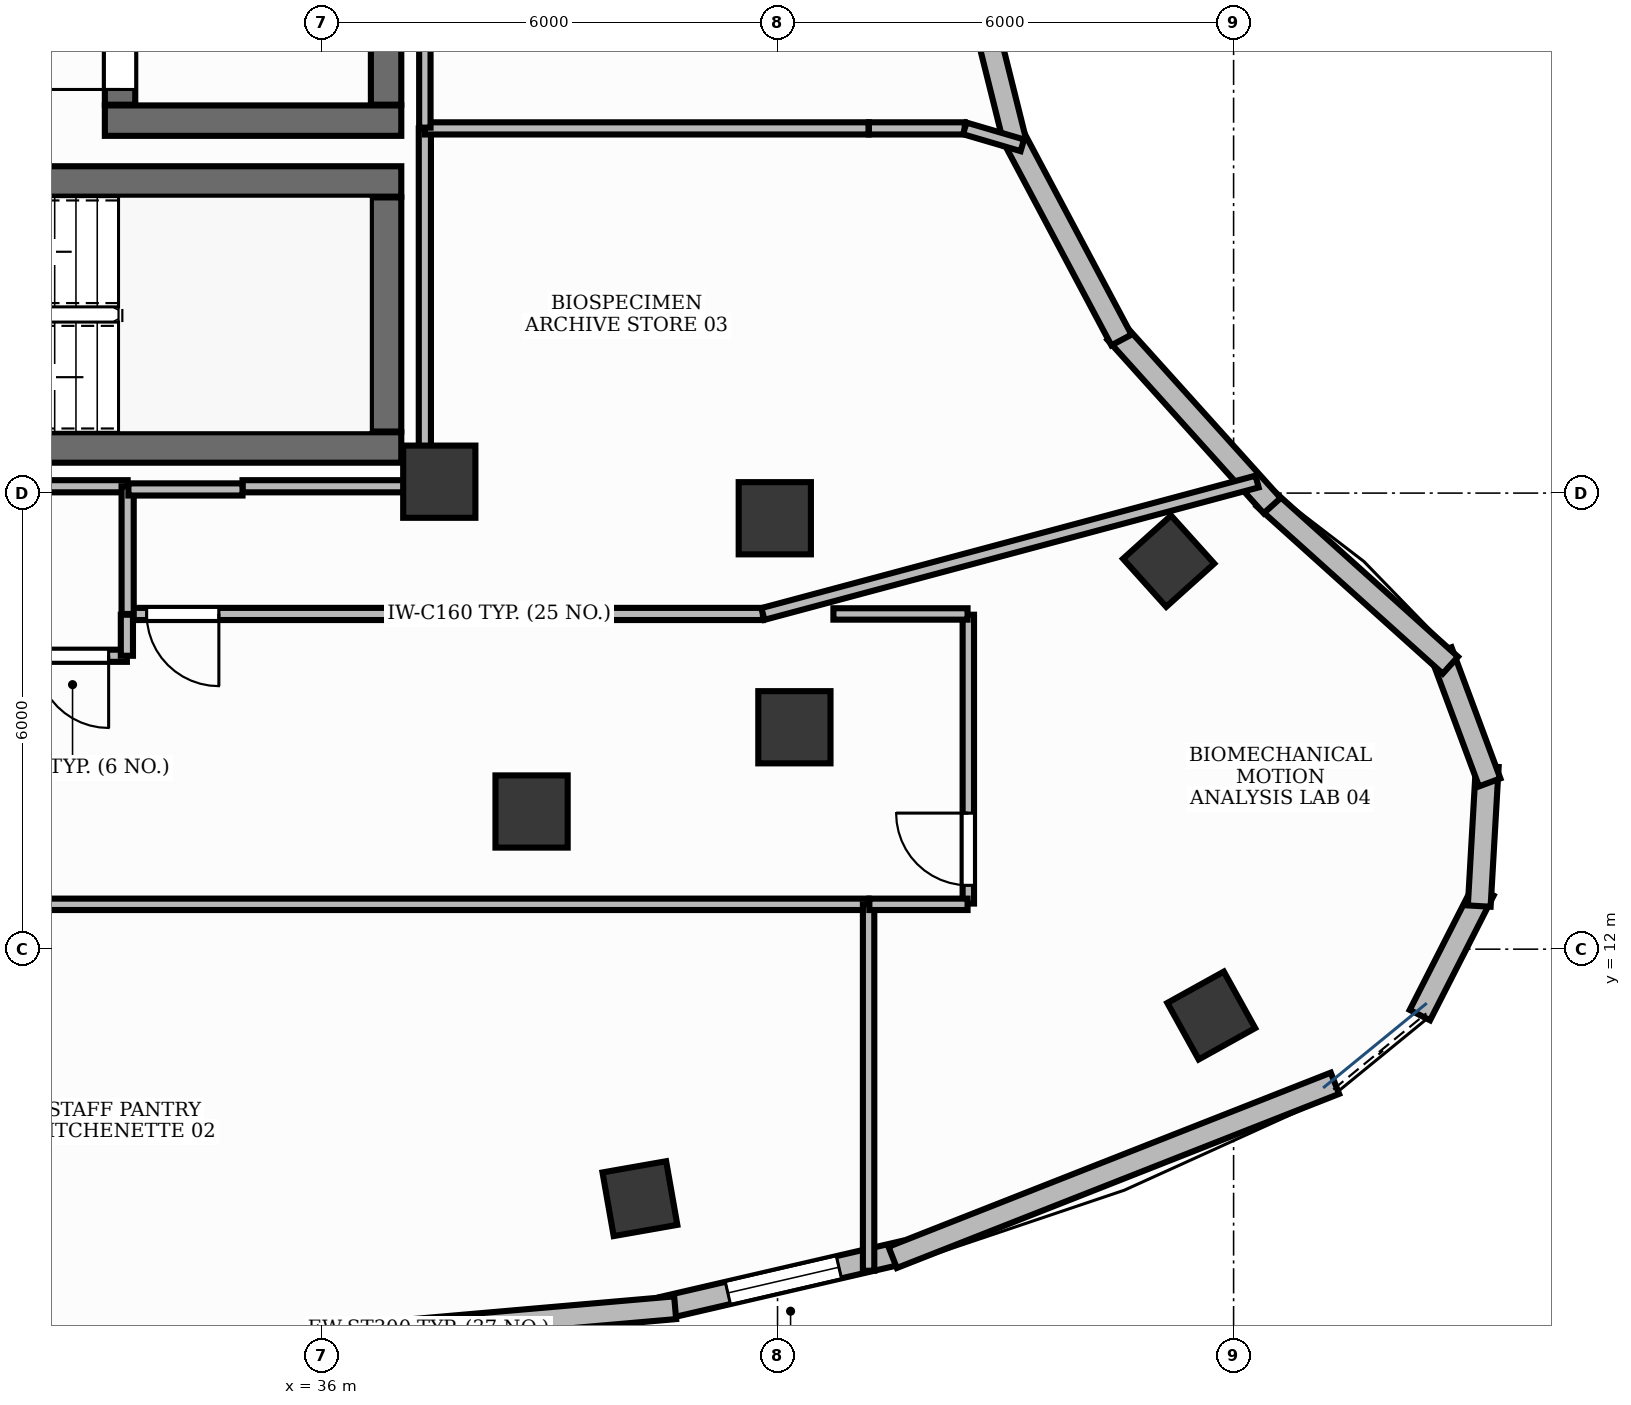
"""IFC4 building model, lengths in metres.
Left out: names, types, materials, properties, quantities, classifications, styles, units other than length and angle.
Written with IfcOpenShell. Run it as: python <this file> out.ifc"""

import sys

from ifc_helpers import new_model, si_unit, direction, frame, frame_2d, origin, origin_2d, place, context, subcontext, project, spatial, rectangle, extrude, element, fill, save


model = new_model("IFC4")
c1 = context("Model", 3, precision=1e-05, world=origin(), true_north=direction((0.0, 1.0)))
c2 = subcontext(c1, "Body", "Model", "MODEL_VIEW")
j1 = project(units=[si_unit("LENGTHUNIT", "METRE"), si_unit("PLANEANGLEUNIT", "RADIAN")], contexts=[c1])
p1 = place(None, origin())
s1 = spatial("IfcSite", under=j1, at=p1, CompositionType="ELEMENT")
p2 = place(p1, origin())
s2 = spatial("IfcBuilding", under=s1, at=p2, CompositionType="ELEMENT")
p3 = place(p2, frame((0.0, 0.0, 268.8)))
s3 = spatial("IfcBuildingStorey", under=s2, at=p3, CompositionType="ELEMENT", Elevation=268.8)
p4 = place(p3, frame((28.852, 18.6, 0.0), z_axis=(0.0, 0.0, 1.0), x_axis=(1.0, 0.0, 0.0)))
e1 = element("IfcWall", 1, at=p4, inside=s3, PredefinedType="SHEAR", context=c2, shape_type="SweptSolid", body=[
    extrude(rectangle(XDim=8.198, YDim=0.4, at=frame_2d((4.099, 0.0))), origin(), (0.0, 0.0, 1.0), 3.9),
])
p5 = place(p3, frame((28.4, 22.1, 0.0), z_axis=(0.0, 0.0, 1.0), x_axis=(1.0, 0.0, 0.0)))
e2 = element("IfcWall", 2, at=p5, inside=s3, PredefinedType="SHEAR", context=c2, shape_type="SweptSolid", body=[
    extrude(rectangle(XDim=8.65, YDim=0.4, at=frame_2d((4.325, 0.0))), origin(), (0.0, 0.0, 1.0), 3.9),
])
p6 = place(p3, frame((36.85, 18.81, 0.0), z_axis=(0.0, 0.0, 1.0), x_axis=(0.0, 1.0, 0.0)))
e3 = element("IfcWall", 3, at=p6, inside=s3, PredefinedType="SHEAR", context=c2, shape_type="SweptSolid", body=[
    extrude(rectangle(XDim=3.08, YDim=0.4, at=frame_2d((1.54, 0.0))), origin(), (0.0, 0.0, 1.0), 3.9),
])
p7 = place(p3, frame((33.15, 22.9, 0.0), z_axis=(0.0, 0.0, 1.0), x_axis=(1.0, 0.0, 0.0)))
e4 = element("IfcWall", 4, at=p7, inside=s3, PredefinedType="SHEAR", context=c2, shape_type="SweptSolid", body=[
    extrude(rectangle(XDim=3.9, YDim=0.4, at=frame_2d((1.95, 0.0))), origin(), (0.0, 0.0, 1.0), 3.9),
])
p8 = place(p3, frame((36.85, 23.11, 0.0), z_axis=(0.0, 0.0, 1.0), x_axis=(0.0, 1.0, 0.0)))
e5 = element("IfcWall", 5, at=p8, inside=s3, PredefinedType="SHEAR", context=c2, shape_type="SweptSolid", body=[
    extrude(rectangle(XDim=7.78, YDim=0.4, at=frame_2d((3.89, 0.0))), origin(), (0.0, 0.0, 1.0), 3.9),
])
p9 = place(p3, frame((33.35, 23.11, 0.0), z_axis=(0.0, 0.0, 1.0), x_axis=(0.0, 1.0, 0.0)))
e6 = element("IfcWall", 6, at=p9, inside=s3, PredefinedType="SHEAR", context=c2, shape_type="SweptSolid", body=[
    extrude(rectangle(XDim=7.78, YDim=0.4, at=frame_2d((3.89, 0.0))), origin(), (0.0, 0.0, 1.0), 3.9),
])
p10 = place(p9, frame((0.2, 0.0, 0.0)))
e7 = element("IfcOpeningElement", 7, at=p10, cuts=e6, PredefinedType="OPENING", context=c2, shape_type="SweptSolid", body=[
    extrude(rectangle(XDim=1.05, YDim=2.15, at=frame_2d((0.525, 1.075))), frame((0.0, 0.215, 0.0), z_axis=(0.0, -1.0, 0.0), x_axis=(1.0, 0.0, 0.0)), (0.0, 0.0, 1.0), 0.43),
])
p11 = place(p3, frame((37.55, 18.15, -0.0), z_axis=(0.0, 0.0, 1.0), x_axis=(1.0, 0.0, 0.0)))
e8 = element("IfcColumn", 8, at=p11, inside=s3, PredefinedType="PILASTER", context=c2, shape_type="SweptSolid", body=[
    extrude(rectangle(XDim=0.95, YDim=0.95, at=origin_2d()), origin(), (0.0, 0.0, 1.0), 3.901),
])
p12 = place(p3, frame((40.189, 8.718, -0.0), z_axis=(0.0, 0.0, 1.0), x_axis=(0.984868307662, 0.173304404339, 0.0)))
e9 = element("IfcColumn", 9, at=p12, inside=s3, PredefinedType="COLUMN", context=c2, shape_type="SweptSolid", body=[
    extrude(rectangle(XDim=0.85, YDim=0.85, at=origin_2d()), origin(), (0.0, 0.0, 1.0), 3.901),
])
p13 = place(p3, frame((38.764, 13.811, -0.0), z_axis=(0.0, 0.0, 1.0), x_axis=(1.0, 0.0, 0.0)))
e10 = element("IfcColumn", 10, at=p13, inside=s3, PredefinedType="COLUMN", context=c2, shape_type="SweptSolid", body=[
    extrude(rectangle(XDim=0.95, YDim=0.95, at=origin_2d()), origin(), (0.0, 0.0, 1.0), 3.901),
])
p14 = place(p3, frame((47.706, 11.127, -0.0), z_axis=(0.0, 0.0, 1.0), x_axis=(0.874535078577, 0.484962262797, 0.0)))
e11 = element("IfcColumn", 11, at=p14, inside=s3, PredefinedType="COLUMN", context=c2, shape_type="SweptSolid", body=[
    extrude(rectangle(XDim=0.85, YDim=0.85, at=origin_2d()), origin(), (0.0, 0.0, 1.0), 3.901),
])
p15 = place(p3, frame((42.222, 14.919, -0.0), z_axis=(0.0, 0.0, 1.0), x_axis=(1.0, 0.0, 0.0)))
e12 = element("IfcColumn", 12, at=p15, inside=s3, PredefinedType="COLUMN", context=c2, shape_type="SweptSolid", body=[
    extrude(rectangle(XDim=0.95, YDim=0.95, at=origin_2d()), origin(), (0.0, 0.0, 1.0), 3.901),
])
p16 = place(p3, frame((47.146, 17.104, -0.0), z_axis=(0.0, 0.0, 1.0), x_axis=(-0.669130606359, 0.743144825477, 0.0)))
e13 = element("IfcColumn", 13, at=p16, inside=s3, PredefinedType="COLUMN", context=c2, shape_type="SweptSolid", body=[
    extrude(rectangle(XDim=0.85, YDim=0.85, at=origin_2d()), origin(), (0.0, 0.0, 1.0), 3.901),
])
p17 = place(p3, frame((41.964, 17.669, -0.0), z_axis=(0.0, 0.0, 1.0), x_axis=(1.0, 0.0, 0.0)))
e14 = element("IfcColumn", 14, at=p17, inside=s3, PredefinedType="COLUMN", context=c2, shape_type="SweptSolid", body=[
    extrude(rectangle(XDim=0.95, YDim=0.95, at=origin_2d()), origin(), (0.0, 0.0, 1.0), 3.901),
])
p18 = place(p3, frame((40.491, 7.279, 0.0), z_axis=(0.0, 0.0, 1.0), x_axis=(0.974196208509, 0.225702785377, 0.0)))
e15 = element("IfcWall", 15, at=p18, inside=s3, PredefinedType="STANDARD", context=c2, shape_type="SweptSolid", body=[
    extrude(rectangle(XDim=3.256, YDim=0.3, at=frame_2d((1.628, 0.0))), origin(), (0.0, 0.0, 1.0), 3.9),
])
p19 = place(p18, frame((0.878, 0.0, 0.95)))
e16 = element("IfcOpeningElement", 16, at=p19, cuts=e15, PredefinedType="OPENING", context=c2, shape_type="SweptSolid", body=[
    extrude(rectangle(XDim=1.5, YDim=1.8, at=frame_2d((0.75, 0.9))), frame((0.0, 0.165, 0.0), z_axis=(0.0, -1.0, 0.0), x_axis=(1.0, 0.0, 0.0)), (0.0, 0.0, 1.0), 0.33),
])
p20 = place(p3, frame((34.164, 6.719, 0.0), z_axis=(0.0, 0.0, 1.0), x_axis=(0.996250708408, 0.086513155053, 0.0)))
e17 = element("IfcWall", 17, at=p20, inside=s3, PredefinedType="STANDARD", context=c2, shape_type="SweptSolid", body=[
    extrude(rectangle(XDim=6.513, YDim=0.3, at=frame_2d((3.257, 0.0))), origin(), (0.0, 0.0, 1.0), 3.9),
])
p21 = place(p3, frame((43.515, 7.945, 0.0), z_axis=(0.0, 0.0, 1.0), x_axis=(0.930516880158, 0.366249007836, 0.0)))
e18 = element("IfcWall", 18, at=p21, inside=s3, PredefinedType="STANDARD", context=c2, shape_type="SweptSolid", body=[
    extrude(rectangle(XDim=6.253, YDim=0.3, at=frame_2d((3.127, 0.0))), origin(), (0.0, 0.0, 1.0), 3.9),
])
for number, where, z_axis, x_axis in (
    (19, (50.451, 11.133, 0.0), (0.0, 0.0, 1.0), (0.454, 0.891, 0.0)),
    (20, (51.232, 12.567, 0.0), (0.0, 0.0, 1.0), (0.057, 0.998, 0.0)),
    (21, (51.369, 14.194, 0.0), (0.0, 0.0, 1.0), (-0.349, 0.937, 0.0)),
):
    element("IfcWall", number, at=place(p3, frame(where, z_axis=z_axis, x_axis=x_axis)), inside=s3, PredefinedType="STANDARD", context=c2, shape_type="SweptSolid", body=[
        extrude(rectangle(XDim=1.842, YDim=0.3, at=frame_2d((0.921, 0.0))), origin(), (0.0, 0.0, 1.0), 3.9),
    ])
p22 = place(p3, frame((50.852, 15.736, 0.0), z_axis=(0.0, 0.0, 1.0), x_axis=(-0.743397410822, 0.668849975393, 0.0)))
e22 = element("IfcWall", 22, at=p22, inside=s3, PredefinedType="STANDARD", context=c2, shape_type="SweptSolid", body=[
    extrude(rectangle(XDim=3.291, YDim=0.3, at=frame_2d((1.646, 0.0))), origin(), (0.0, 0.0, 1.0), 3.9),
])
p23 = place(p3, frame((48.508, 17.835, 0.0), z_axis=(0.0, 0.0, 1.0), x_axis=(-0.669127242861, 0.743147853971, 0.0)))
e23 = element("IfcWall", 23, at=p23, inside=s3, PredefinedType="STANDARD", context=c2, shape_type="SweptSolid", body=[
    extrude(rectangle(XDim=3.071, YDim=0.3, at=frame_2d((1.535, 0.0))), origin(), (0.0, 0.0, 1.0), 3.9),
])
p24 = place(p3, frame((46.524, 20.014, 0.0), z_axis=(0.0, 0.0, 1.0), x_axis=(-0.469494296004, 0.882935505017, 0.0)))
e24 = element("IfcWall", 24, at=p24, inside=s3, PredefinedType="STANDARD", context=c2, shape_type="SweptSolid", body=[
    extrude(rectangle(XDim=3.071, YDim=0.3, at=frame_2d((1.535, 0.0))), origin(), (0.0, 0.0, 1.0), 3.9),
])
p25 = place(p3, frame((45.127, 22.609, 0.0), z_axis=(0.0, 0.0, 1.0), x_axis=(-0.241880750878, 0.970305983881, 0.0)))
e25 = element("IfcWall", 25, at=p25, inside=s3, PredefinedType="STANDARD", context=c2, shape_type="SweptSolid", body=[
    extrude(rectangle(XDim=3.07, YDim=0.3, at=frame_2d((1.535, 0.0))), origin(), (0.0, 0.0, 1.0), 3.9),
])
p26 = place(p3, frame((33.44, 15.86, 0.0), z_axis=(0.0, 0.0, 1.0), x_axis=(-1.0, 0.0, 0.0)))
e26 = element("IfcWall", 26, at=p26, inside=s3, PredefinedType="PARTITIONING", context=c2, shape_type="SweptSolid", body=[
    extrude(rectangle(XDim=3.28, YDim=0.16, at=frame_2d((1.64, 0.0))), origin(), (0.0, 0.0, 1.0), 2.91),
])
p27 = place(p26, frame((0.24, 0.0, 0.0)))
e27 = element("IfcOpeningElement", 27, at=p27, cuts=e26, PredefinedType="OPENING", context=c2, shape_type="SweptSolid", body=[
    extrude(rectangle(XDim=0.95, YDim=2.15, at=frame_2d((0.475, 1.075))), frame((0.0, 0.095, 0.0), z_axis=(0.0, -1.0, 0.0), x_axis=(1.0, 0.0, 0.0)), (0.0, 0.0, 1.0), 0.19),
])
p28 = place(p3, frame((30.314, 12.59, 0.0), z_axis=(0.0, 0.0, 1.0), x_axis=(1.0, 0.0, 0.0)))
e28 = element("IfcWall", 28, at=p28, inside=s3, PredefinedType="PARTITIONING", context=c2, shape_type="SweptSolid", body=[
    extrude(rectangle(XDim=12.884, YDim=0.15, at=frame_2d((6.442, 0.0))), origin(), (0.0, 0.0, 1.0), 2.91),
])
p29 = place(p28, frame((0.24, 0.0, 0.0)))
e29 = element("IfcOpeningElement", 29, at=p29, cuts=e28, PredefinedType="OPENING", context=c2, shape_type="SweptSolid", body=[
    extrude(rectangle(XDim=0.95, YDim=2.15, at=frame_2d((0.475, 1.075))), frame((0.0, 0.09, 0.0), z_axis=(0.0, -1.0, 0.0), x_axis=(1.0, 0.0, 0.0)), (0.0, 0.0, 1.0), 0.18),
])
p30 = place(p3, frame((41.808, 16.41, 0.0), z_axis=(0.0, 0.0, 1.0), x_axis=(-1.0, 0.0, 0.0)))
e30 = element("IfcWall", 30, at=p30, inside=s3, PredefinedType="PARTITIONING", context=c2, shape_type="SweptSolid", body=[
    extrude(rectangle(XDim=8.348, YDim=0.16, at=frame_2d((4.174, 0.0))), origin(), (0.0, 0.0, 1.0), 2.91),
])
p31 = place(p30, frame((7.158, 0.0, 0.0)))
e31 = element("IfcOpeningElement", 31, at=p31, cuts=e30, PredefinedType="OPENING", context=c2, shape_type="SweptSolid", body=[
    extrude(rectangle(XDim=0.95, YDim=2.15, at=frame_2d((0.475, 1.075))), frame((0.0, 0.095, 0.0), z_axis=(0.0, -1.0, 0.0), x_axis=(1.0, 0.0, 0.0)), (0.0, 0.0, 1.0), 0.19),
])
p32 = place(p3, frame((44.51, 12.6, 0.0), z_axis=(0.0, 0.0, 1.0), x_axis=(0.0, 1.0, 0.0)))
e32 = element("IfcWall", 32, at=p32, inside=s3, PredefinedType="PARTITIONING", context=c2, shape_type="SweptSolid", body=[
    extrude(rectangle(XDim=3.8, YDim=0.15, at=frame_2d((1.9, 0.0))), origin(), (0.0, 0.0, 1.0), 2.91),
])
p33 = place(p32, frame((0.24, 0.0, 0.0)))
e33 = element("IfcOpeningElement", 33, at=p33, cuts=e32, PredefinedType="OPENING", context=c2, shape_type="SweptSolid", body=[
    extrude(rectangle(XDim=0.95, YDim=2.15, at=frame_2d((0.475, 1.075))), frame((0.0, 0.09, 0.0), z_axis=(0.0, -1.0, 0.0), x_axis=(1.0, 0.0, 0.0)), (0.0, 0.0, 1.0), 0.18),
])
p34 = place(p3, frame((33.44, 16.4, 0.0), z_axis=(0.0, 0.0, 1.0), x_axis=(0.0, -1.0, 0.0)))
e34 = element("IfcWall", 34, at=p34, inside=s3, PredefinedType="PARTITIONING", context=c2, shape_type="SweptSolid", body=[
    extrude(rectangle(XDim=0.54, YDim=0.16, at=frame_2d((0.27, 0.0))), origin(), (0.0, 0.0, 1.0), 2.91),
])
p35 = place(p3, frame((30.15, 18.09, 0.0), z_axis=(0.0, 0.0, 1.0), x_axis=(1.0, 0.0, 0.0)))
e35 = element("IfcWall", 35, at=p35, inside=s3, PredefinedType="PARTITIONING", context=c2, shape_type="SweptSolid", body=[
    extrude(rectangle(XDim=3.3, YDim=0.16, at=frame_2d((1.65, 0.0))), origin(), (0.0, 0.0, 1.0), 2.91),
])
p36 = place(p3, frame((33.45, 18.09, 0.0), z_axis=(0.0, 0.0, 1.0), x_axis=(0.0, -1.0, 0.0)))
e36 = element("IfcWall", 36, at=p36, inside=s3, PredefinedType="PARTITIONING", context=c2, shape_type="SweptSolid", body=[
    extrude(rectangle(XDim=1.68, YDim=0.16, at=frame_2d((0.84, 0.0))), origin(), (0.0, 0.0, 1.0), 2.91),
])
p37 = place(p3, frame((43.198, 12.59, 0.0), z_axis=(0.0, 0.0, 1.0), x_axis=(0.0, -1.0, 0.0)))
e37 = element("IfcWall", 37, at=p37, inside=s3, PredefinedType="PARTITIONING", context=c2, shape_type="SweptSolid", body=[
    extrude(rectangle(XDim=4.821, YDim=0.15, at=frame_2d((2.41, 0.0))), origin(), (0.0, 0.0, 1.0), 2.91),
])
p38 = place(p3, frame((34.961, 18.09, 0.0), z_axis=(0.0, 0.0, 1.0), x_axis=(1.0, 0.0, 0.0)))
e38 = element("IfcWall", 38, at=p38, inside=s3, PredefinedType="PARTITIONING", context=c2, shape_type="SweptSolid", body=[
    extrude(rectangle(XDim=2.389, YDim=0.16, at=frame_2d((1.194, 0.0))), origin(), (0.0, 0.0, 1.0), 2.91),
])
p39 = place(p3, frame((37.36, 18.1, 0.0), z_axis=(0.0, 0.0, 1.0), x_axis=(0.0, 1.0, 0.0)))
e39 = element("IfcWall", 39, at=p39, inside=s3, PredefinedType="PARTITIONING", context=c2, shape_type="SweptSolid", body=[
    extrude(rectangle(XDim=4.698, YDim=0.16, at=frame_2d((2.349, 0.0))), origin(), (0.0, 0.0, 1.0), 2.91),
])
p40 = place(p3, frame((37.36, 22.798, 0.0), z_axis=(0.0, 0.0, 1.0), x_axis=(1.0, 0.0, 0.0)))
e40 = element("IfcWall", 40, at=p40, inside=s3, PredefinedType="PARTITIONING", context=c2, shape_type="SweptSolid", body=[
    extrude(rectangle(XDim=5.838, YDim=0.16, at=frame_2d((2.919, 0.0))), origin(), (0.0, 0.0, 1.0), 2.91),
])
p41 = place(p3, frame((43.202, 22.798, 0.0), z_axis=(0.0, 0.0, 1.0), x_axis=(1.0, 0.0, 0.0)))
e41 = element("IfcWall", 41, at=p41, inside=s3, PredefinedType="PARTITIONING", context=c2, shape_type="SweptSolid", body=[
    extrude(rectangle(XDim=1.261, YDim=0.16, at=frame_2d((0.63, 0.0))), origin(), (0.0, 0.0, 1.0), 2.91),
])
p42 = place(p3, frame((44.463, 22.798, 0.0), z_axis=(0.0, 0.0, 1.0), x_axis=(0.959419641558, -0.281982182759, 0.0)))
e42 = element("IfcWall", 42, at=p42, inside=s3, PredefinedType="PARTITIONING", context=c2, shape_type="SweptSolid", body=[
    extrude(rectangle(XDim=0.79, YDim=0.16, at=frame_2d((0.395, 0.0))), origin(), (0.0, 0.0, 1.0), 2.91),
])
p43 = place(p3, frame((48.309, 18.152, 0.0), z_axis=(0.0, 0.0, 1.0), x_axis=(-0.965918743998, -0.258845475127, 0.0)))
e43 = element("IfcWall", 43, at=p43, inside=s3, PredefinedType="PARTITIONING", context=c2, shape_type="SweptSolid", body=[
    extrude(rectangle(XDim=6.731, YDim=0.16, at=frame_2d((3.365, 0.0))), origin(), (0.0, 0.0, 1.0), 2.91),
])
p44 = place(p3, frame((33.46, 18.048, 0.0), z_axis=(0.0, 0.0, 1.0), x_axis=(1.0, 0.0, 0.0)))
e44 = element("IfcWall", 44, at=p44, inside=s3, PredefinedType="PARTITIONING", context=c2, shape_type="SweptSolid", body=[
    extrude(rectangle(XDim=1.501, YDim=0.16, at=frame_2d((0.75, 0.0))), origin(), (0.0, 0.0, 1.0), 2.91),
])
p45 = place(p3, frame((43.208, 12.59, 0.0), z_axis=(0.0, 0.0, 1.0), x_axis=(1.0, 0.0, 0.0)))
e45 = element("IfcWall", 45, at=p45, inside=s3, PredefinedType="PARTITIONING", context=c2, shape_type="SweptSolid", body=[
    extrude(rectangle(XDim=1.292, YDim=0.15, at=frame_2d((0.646, 0.0))), origin(), (0.0, 0.0, 1.0), 2.91),
])
p46 = place(p3, frame((44.5, 16.41, 0.0), z_axis=(0.0, 0.0, 1.0), x_axis=(-1.0, 0.0, 0.0)))
e46 = element("IfcWall", 46, at=p46, inside=s3, PredefinedType="PARTITIONING", context=c2, shape_type="SweptSolid", body=[
    extrude(rectangle(XDim=1.765, YDim=0.15, at=frame_2d((0.882, 0.0))), origin(), (0.0, 0.0, 1.0), 2.91),
])
p47 = place(p3, frame((37.36, 22.808, 0.0), z_axis=(0.0, 0.0, 1.0), x_axis=(0.0, 1.0, 0.0)))
e47 = element("IfcWall", 47, at=p47, inside=s3, PredefinedType="PARTITIONING", context=c2, shape_type="SweptSolid", body=[
    extrude(rectangle(XDim=13.092, YDim=0.15, at=frame_2d((6.546, 0.0))), origin(), (0.0, 0.0, 1.0), 2.91),
])
p48 = place(p19, origin())
e48 = element("IfcWindow", 48, at=p48, inside=s3, PartitioningType="DOUBLE_PANEL_VERTICAL", PredefinedType="WINDOW", context=c2, shape_type="SweptSolid", body=[
    extrude(rectangle(XDim=1.5, YDim=1.8, at=frame_2d((0.75, 0.9))), frame((0.0, 0.03, 0.0), z_axis=(0.0, -1.0, 0.0), x_axis=(1.0, 0.0, 0.0)), (0.0, 0.0, 1.0), 0.06),
])
fill(e16, e48)
p49 = place(p10, origin())
e49 = element("IfcDoor", 49, at=p49, inside=s3, OperationType="SINGLE_SWING_LEFT", PredefinedType="DOOR", context=c2, shape_type="SweptSolid", body=[
    extrude(rectangle(XDim=1.05, YDim=2.15, at=frame_2d((0.525, 1.075))), frame((0.0, 0.025, 0.0), z_axis=(0.0, -1.0, 0.0), x_axis=(1.0, 0.0, 0.0)), (0.0, 0.0, 1.0), 0.05),
])
fill(e7, e49)
p50 = place(p27, origin())
e50 = element("IfcDoor", 50, at=p50, inside=s3, OperationType="SINGLE_SWING_LEFT", PredefinedType="DOOR", context=c2, shape_type="SweptSolid", body=[
    extrude(rectangle(XDim=0.95, YDim=2.15, at=frame_2d((0.475, 1.075))), frame((0.0, 0.025, 0.0), z_axis=(0.0, -1.0, 0.0), x_axis=(1.0, 0.0, 0.0)), (0.0, 0.0, 1.0), 0.05),
])
fill(e27, e50)
p51 = place(p31, origin())
e51 = element("IfcDoor", 51, at=p51, inside=s3, OperationType="SINGLE_SWING_LEFT", PredefinedType="DOOR", context=c2, shape_type="SweptSolid", body=[
    extrude(rectangle(XDim=0.95, YDim=2.15, at=frame_2d((0.475, 1.075))), frame((0.0, 0.025, 0.0), z_axis=(0.0, -1.0, 0.0), x_axis=(1.0, 0.0, 0.0)), (0.0, 0.0, 1.0), 0.05),
])
fill(e31, e51)
p52 = place(p33, origin())
e52 = element("IfcDoor", 52, at=p52, inside=s3, OperationType="SINGLE_SWING_RIGHT", PredefinedType="DOOR", context=c2, shape_type="SweptSolid", body=[
    extrude(rectangle(XDim=0.95, YDim=2.15, at=frame_2d((0.475, 1.075))), frame((0.0, 0.025, 0.0), z_axis=(0.0, -1.0, 0.0), x_axis=(1.0, 0.0, 0.0)), (0.0, 0.0, 1.0), 0.05),
])
fill(e33, e52)
save(model, sys.argv[1])
